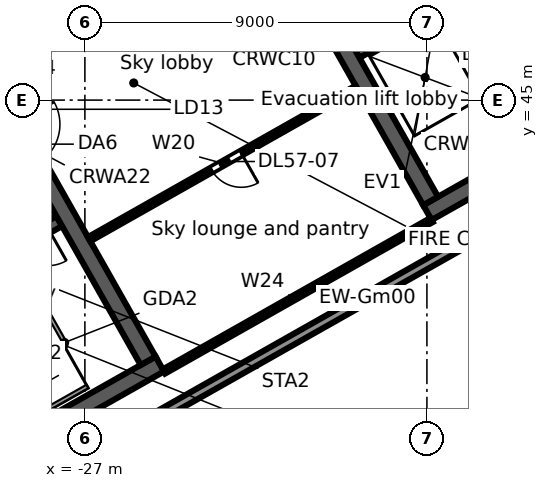
"""IFC4 building model, lengths in metres.
Left out: names, types, materials, properties, quantities, classifications, styles, units other than length and angle.
Written with IfcOpenShell. Run it as: python <this file> out.ifc"""

import sys

from ifc_helpers import new_model, si_unit, direction, frame, frame_2d, origin, place, context, subcontext, project, spatial, rectangle, extrude, element, fill, save


model = new_model("IFC4")
c1 = context("Model", 3, precision=1e-05, world=origin(), true_north=direction((0.0, 1.0)))
c2 = subcontext(c1, "Body", "Model", "MODEL_VIEW")
j1 = project(units=[si_unit("LENGTHUNIT", "METRE"), si_unit("PLANEANGLEUNIT", "RADIAN")], contexts=[c1])
p1 = place(None, origin())
s1 = spatial("IfcSite", under=j1, at=p1, CompositionType="ELEMENT")
p2 = place(p1, origin())
s2 = spatial("IfcBuilding", under=s1, at=p2, CompositionType="ELEMENT")
p3 = place(p2, frame((0.0, 0.0, 258.2)))
s3 = spatial("IfcBuildingStorey", under=s2, at=p3, CompositionType="ELEMENT", Elevation=258.2)
p4 = place(p3, frame((-0.364, 50.666, 0.0), z_axis=(0.0, 0.0, 1.0), x_axis=(-0.870355021882, -0.492424751494, 0.0)))
e1 = element("IfcWall", 1, at=p4, inside=s3, PredefinedType="STANDARD", context=c2, shape_type="SweptSolid", body=[
    extrude(rectangle(XDim=44.126, YDim=0.25, at=frame_2d((22.063, 0.0))), origin(), (0.0, 0.0, 1.0), 3.12),
])
p5 = place(p3, frame((-56.251, 37.302, 0.0), z_axis=(0.0, 0.0, 1.0), x_axis=(0.87035543516, 0.49242402103, 0.0)))
e2 = element("IfcWall", 2, at=p5, inside=s3, PredefinedType="STANDARD", context=c2, shape_type="SweptSolid", body=[
    extrude(rectangle(XDim=62.067, YDim=0.25, at=frame_2d((31.033, 0.0))), origin(), (0.0, 0.0, 1.0), 3.512),
])
p6 = place(p3, frame((-39.825, 29.684, 0.0), z_axis=(0.0, 0.0, 1.0), x_axis=(0.870353598469, 0.492427267353, 0.0)))
e3 = element("IfcWall", 3, at=p6, inside=s3, PredefinedType="SOLIDWALL", context=c2, shape_type="SweptSolid", body=[
    extrude(rectangle(XDim=17.0, YDim=0.45, at=frame_2d((8.5, 0.0))), origin(), (0.0, 0.0, 1.0), 4.22),
])
p7 = place(p6, frame((7.2, 0.0, 0.0)))
e4 = element("IfcOpeningElement", 4, at=p7, cuts=e3, PredefinedType="OPENING", context=c2, shape_type="SweptSolid", body=[
    extrude(rectangle(XDim=1.2, YDim=2.1, at=frame_2d((0.6, 1.05))), frame((0.0, 0.235, 0.0), z_axis=(0.0, -1.0, 0.0), x_axis=(1.0, 0.0, 0.0)), (0.0, 0.0, 1.0), 0.47),
])
p8 = place(p3, frame((-34.245, 38.097, 0.0), z_axis=(0.0, 0.0, 1.0), x_axis=(0.870360409231, 0.492415229297, 0.0)))
e5 = element("IfcWall", 5, at=p8, inside=s3, PredefinedType="SOLIDWALL", context=c2, shape_type="SweptSolid", body=[
    extrude(rectangle(XDim=7.55, YDim=0.3, at=frame_2d((3.775, 0.0))), origin(), (0.0, 0.0, 1.0), 4.22),
])
p9 = place(p8, frame((6.2, 0.0, 0.0)))
e6 = element("IfcOpeningElement", 6, at=p9, cuts=e5, PredefinedType="OPENING", context=c2, shape_type="SweptSolid", body=[
    extrude(rectangle(XDim=1.0, YDim=2.1, at=frame_2d((0.5, 1.05))), frame((0.0, 0.16, 0.0), z_axis=(0.0, -1.0, 0.0), x_axis=(1.0, 0.0, 0.0)), (0.0, 0.0, 1.0), 0.32),
])
p10 = place(p3, frame((-31.787, 49.542, 0.0), z_axis=(0.0, 0.0, 1.0), x_axis=(0.492421378713, -0.870356930107, 0.0)))
e7 = element("IfcWall", 7, at=p10, inside=s3, PredefinedType="SOLIDWALL", context=c2, shape_type="SweptSolid", body=[
    extrude(rectangle(XDim=13.1, YDim=0.45, at=frame_2d((6.55, 0.0))), origin(), (0.0, 0.0, 1.0), 4.22),
])
p11 = place(p10, frame((5.95, 0.0, 0.0)))
e8 = element("IfcOpeningElement", 8, at=p11, cuts=e7, PredefinedType="OPENING", context=c2, shape_type="SweptSolid", body=[
    extrude(rectangle(XDim=1.2, YDim=2.1, at=frame_2d((0.6, 1.05))), frame((0.0, 0.235, 0.0), z_axis=(0.0, -1.0, 0.0), x_axis=(1.0, 0.0, 0.0)), (0.0, 0.0, 1.0), 0.47),
])
p12 = place(p3, frame((-17.988, 42.039, 0.0), z_axis=(0.0, 0.0, 1.0), x_axis=(0.870360574057, 0.492414937962, 0.0)))
e9 = element("IfcWall", 9, at=p12, inside=s3, PredefinedType="SOLIDWALL", context=c2, shape_type="SweptSolid", body=[
    extrude(rectangle(XDim=15.0, YDim=0.45, at=frame_2d((7.5, 0.0))), origin(), (0.0, 0.0, 1.0), 4.22),
])
p13 = place(p12, frame((6.1, 0.0, 0.0)))
e10 = element("IfcOpeningElement", 10, at=p13, cuts=e9, PredefinedType="OPENING", context=c2, shape_type="SweptSolid", body=[
    extrude(rectangle(XDim=1.2, YDim=2.1, at=frame_2d((0.6, 1.05))), frame((0.0, 0.235, 0.0), z_axis=(0.0, -1.0, 0.0), x_axis=(1.0, 0.0, 0.0)), (0.0, 0.0, 1.0), 0.47),
])
p14 = place(p3, frame((-19.849, 46.242, 0.0), z_axis=(0.0, 0.0, 1.0), x_axis=(0.870347559728, 0.492437940532, 0.0)))
e11 = element("IfcWall", 11, at=p14, inside=s3, PredefinedType="SOLIDWALL", context=c2, shape_type="SweptSolid", body=[
    extrude(rectangle(XDim=5.05, YDim=0.3, at=frame_2d((2.525, 0.0))), origin(), (0.0, 0.0, 1.0), 4.22),
])
p15 = place(p14, frame((0.7, 0.0, 0.0)))
e12 = element("IfcOpeningElement", 12, at=p15, cuts=e11, PredefinedType="OPENING", context=c2, shape_type="SweptSolid", body=[
    extrude(rectangle(XDim=1.1, YDim=2.1, at=frame_2d((0.55, 1.05))), frame((0.0, 0.16, 0.0), z_axis=(0.0, -1.0, 0.0), x_axis=(1.0, 0.0, 0.0)), (0.0, 0.0, 1.0), 0.32),
])
p16 = place(p14, frame((3.3, 0.0, 0.0)))
e13 = element("IfcOpeningElement", 13, at=p16, cuts=e11, PredefinedType="OPENING", context=c2, shape_type="SweptSolid", body=[
    extrude(rectangle(XDim=1.1, YDim=2.1, at=frame_2d((0.55, 1.05))), frame((0.0, 0.16, 0.0), z_axis=(0.0, -1.0, 0.0), x_axis=(1.0, 0.0, 0.0)), (0.0, 0.0, 1.0), 0.32),
])
p17 = place(p3, frame((-24.353, 53.747, 0.0), z_axis=(0.0, 0.0, 1.0), x_axis=(0.492435496286, -0.870348942665, 0.0)))
e14 = element("IfcWall", 14, at=p17, inside=s3, PredefinedType="SOLIDWALL", context=c2, shape_type="SweptSolid", body=[
    extrude(rectangle(XDim=13.1, YDim=0.45, at=frame_2d((6.55, 0.0))), origin(), (0.0, 0.0, 1.0), 4.22),
])
p18 = place(p17, frame((5.95, 0.0, 0.0)))
e15 = element("IfcOpeningElement", 15, at=p18, cuts=e14, PredefinedType="OPENING", context=c2, shape_type="SweptSolid", body=[
    extrude(rectangle(XDim=1.2, YDim=2.1, at=frame_2d((0.6, 1.05))), frame((0.0, 0.235, 0.0), z_axis=(0.0, -1.0, 0.0), x_axis=(1.0, 0.0, 0.0)), (0.0, 0.0, 1.0), 0.47),
])
p19 = place(p3, frame((-17.469, 47.417, 0.0), z_axis=(0.0, 0.0, 1.0), x_axis=(0.492453686477, -0.870338650569, 0.0)))
e16 = element("IfcWall", 16, at=p19, inside=s3, PredefinedType="SOLIDWALL", context=c2, shape_type="SweptSolid", body=[
    extrude(rectangle(XDim=4.2, YDim=0.2, at=frame_2d((2.1, 0.0))), origin(), (0.0, 0.0, 1.0), 4.22),
])
p20 = place(p3, frame((-26.888, 41.34, 0.0), z_axis=(0.0, 0.0, 1.0), x_axis=(0.870318838095, 0.492488700436, 0.0)))
e17 = element("IfcWall", 17, at=p20, inside=s3, PredefinedType="PARTITIONING", context=c2, shape_type="SweptSolid", body=[
    extrude(rectangle(XDim=8.091, YDim=0.125, at=frame_2d((4.046, 0.0))), origin(), (0.0, 0.0, 1.0), 3.492),
])
p21 = place(p20, frame((3.7, 0.0, 0.0)))
e18 = element("IfcOpeningElement", 18, at=p21, cuts=e17, PredefinedType="OPENING", context=c2, shape_type="SweptSolid", body=[
    extrude(rectangle(XDim=0.9, YDim=2.1, at=frame_2d((0.45, 1.05))), frame((0.0, 0.073, 0.0), z_axis=(0.0, -1.0, 0.0), x_axis=(1.0, 0.0, 0.0)), (0.0, 0.0, 1.0), 0.145),
])
p22 = place(p3, frame((-24.919, 37.859, 0.0), z_axis=(0.0, 0.0, 1.0), x_axis=(0.870357635969, 0.492420131098, 0.0)))
e19 = element("IfcWall", 19, at=p22, inside=s3, PredefinedType="PARTITIONING", context=c2, shape_type="SweptSolid", body=[
    extrude(rectangle(XDim=8.091, YDim=0.125, at=frame_2d((4.045, 0.0))), origin(), (0.0, 0.0, 1.0), 3.492),
])
p23 = place(p21, frame((0.9, 0.0, 0.0), z_axis=(0.0, 0.0, 1.0), x_axis=(-1.0, 0.0, 0.0)))
e20 = element("IfcDoor", 20, at=p23, inside=s3, OperationType="SINGLE_SWING_LEFT", PredefinedType="DOOR", context=c2, shape_type="SweptSolid", body=[
    extrude(rectangle(XDim=0.9, YDim=2.1, at=frame_2d((0.45, 1.05))), frame((0.0, 0.025, 0.0), z_axis=(0.0, -1.0, 0.0), x_axis=(1.0, 0.0, 0.0)), (0.0, 0.0, 1.0), 0.05),
])
fill(e18, e20)
save(model, sys.argv[1])
